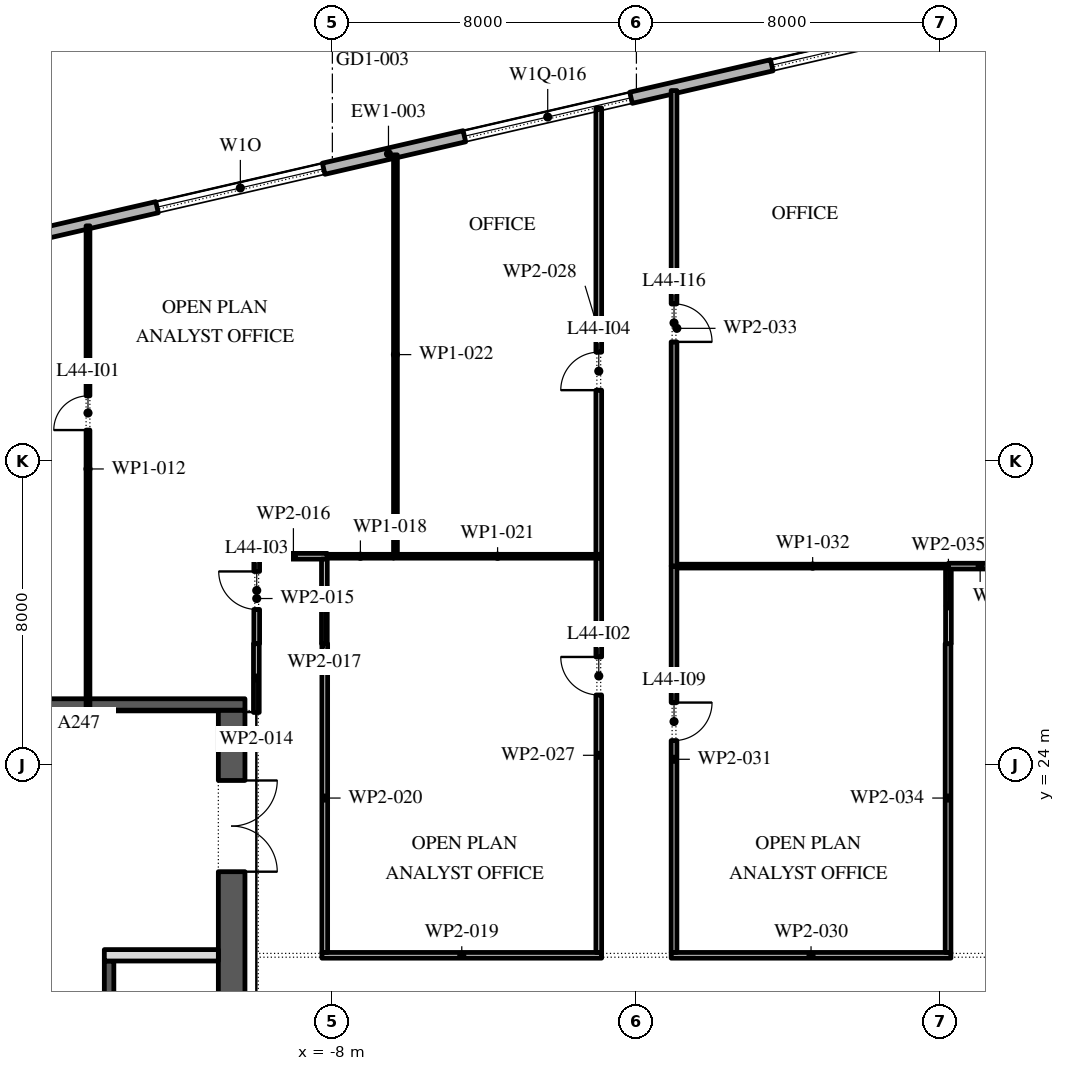
"""IFC4 building model, lengths in metres.
Left out: names, types, materials, properties, quantities, classifications, styles, units other than length and angle.
Written with IfcOpenShell. Run it as: python <this file> out.ifc"""

import sys

from ifc_helpers import new_model, si_unit, direction, frame, frame_2d, origin, place, context, subcontext, project, spatial, rectangle, extrude, element, fill, save


model = new_model("IFC4")
c1 = context("Model", 3, precision=1e-05, world=origin(), true_north=direction((0.0, 1.0)))
c2 = subcontext(c1, "Body", "Model", "MODEL_VIEW")
j1 = project(units=[si_unit("LENGTHUNIT", "METRE"), si_unit("PLANEANGLEUNIT", "RADIAN")], contexts=[c1])
p1 = place(None, origin())
s1 = spatial("IfcSite", under=j1, at=p1, CompositionType="ELEMENT")
p2 = place(p1, origin())
s2 = spatial("IfcBuilding", under=s1, at=p2, CompositionType="ELEMENT")
p3 = place(p2, frame((0.0, 0.0, 201.0)))
s3 = spatial("IfcBuildingStorey", under=s2, at=p3, CompositionType="ELEMENT", Elevation=201.0)
p4 = place(p3, frame((17.592, 45.657, 0.0), z_axis=(0.0, 0.0, 1.0), x_axis=(-0.974370243697, -0.224950279389, 0.0)))
e1 = element("IfcWall", 1, at=p4, inside=s3, PredefinedType="STANDARD", context=c2, shape_type="SweptSolid", body=[
    extrude(rectangle(XDim=49.5, YDim=0.3, at=frame_2d((24.75, 0.0))), origin(), (0.0, 0.0, 1.0), 4.0),
])
p5 = place(p4, frame((2.8, 0.0, 0.0)))
e2 = element("IfcOpeningElement", 2, at=p5, cuts=e1, PredefinedType="OPENING", context=c2, shape_type="SweptSolid", body=[
    extrude(rectangle(XDim=2.4, YDim=3.5, at=frame_2d((1.2, 1.75))), frame((0.0, 0.16, 0.0), z_axis=(0.0, -1.0, 0.0), x_axis=(1.0, 0.0, 0.0)), (0.0, 0.0, 1.0), 0.32),
])
p6 = place(p4, frame((9.9, 0.0, 0.45)))
e3 = element("IfcOpeningElement", 3, at=p6, cuts=e1, PredefinedType="OPENING", context=c2, shape_type="SweptSolid", body=[
    extrude(rectangle(XDim=4.5, YDim=2.45, at=frame_2d((2.25, 1.225))), frame((0.0, 0.16, 0.0), z_axis=(0.0, -1.0, 0.0), x_axis=(1.0, 0.0, 0.0)), (0.0, 0.0, 1.0), 0.32),
])
p7 = place(p4, frame((18.2, 0.0, 0.45)))
e4 = element("IfcOpeningElement", 4, at=p7, cuts=e1, PredefinedType="OPENING", context=c2, shape_type="SweptSolid", body=[
    extrude(rectangle(XDim=4.5, YDim=2.45, at=frame_2d((2.25, 1.225))), frame((0.0, 0.16, 0.0), z_axis=(0.0, -1.0, 0.0), x_axis=(1.0, 0.0, 0.0)), (0.0, 0.0, 1.0), 0.32),
])
p8 = place(p4, frame((26.5, 0.0, 0.45)))
e5 = element("IfcOpeningElement", 5, at=p8, cuts=e1, PredefinedType="OPENING", context=c2, shape_type="SweptSolid", body=[
    extrude(rectangle(XDim=4.5, YDim=2.5, at=frame_2d((2.25, 1.25))), frame((0.0, 0.16, 0.0), z_axis=(0.0, -1.0, 0.0), x_axis=(1.0, 0.0, 0.0)), (0.0, 0.0, 1.0), 0.32),
])
p9 = place(p4, frame((35.85, 0.0, 0.0)))
e6 = element("IfcOpeningElement", 6, at=p9, cuts=e1, PredefinedType="OPENING", context=c2, shape_type="SweptSolid", body=[
    extrude(rectangle(XDim=2.4, YDim=3.5, at=frame_2d((1.2, 1.75))), frame((0.0, 0.16, 0.0), z_axis=(0.0, -1.0, 0.0), x_axis=(1.0, 0.0, 0.0)), (0.0, 0.0, 1.0), 0.32),
])
p10 = place(p4, frame((43.1, 0.0, 0.45)))
e7 = element("IfcOpeningElement", 7, at=p10, cuts=e1, PredefinedType="OPENING", context=c2, shape_type="SweptSolid", body=[
    extrude(rectangle(XDim=4.5, YDim=2.675, at=frame_2d((2.25, 1.337))), frame((0.0, 0.16, 0.0), z_axis=(0.0, -1.0, 0.0), x_axis=(1.0, 0.0, 0.0)), (0.0, 0.0, 1.0), 0.32),
])
p11 = place(p3, frame((-10.65, -2.45, 0.0), z_axis=(0.0, 0.0, 1.0), x_axis=(0.0, 1.0, 0.0)))
e8 = element("IfcWall", 8, at=p11, inside=s3, PredefinedType="SHEAR", context=c2, shape_type="SweptSolid", body=[
    extrude(rectangle(XDim=27.9, YDim=0.7, at=frame_2d((13.95, 0.0))), origin(), (0.0, 0.0, 1.0), 4.0),
])
p12 = place(p11, frame((23.65, 0.0, 0.0)))
e9 = element("IfcOpeningElement", 9, at=p12, cuts=e8, PredefinedType="OPENING", context=c2, shape_type="SweptSolid", body=[
    extrude(rectangle(XDim=2.4, YDim=2.1, at=frame_2d((1.2, 1.05))), frame((0.0, 0.36, 0.0), z_axis=(0.0, -1.0, 0.0), x_axis=(1.0, 0.0, 0.0)), (0.0, 0.0, 1.0), 0.72),
])
p13 = place(p11, frame((1.387, 0.0, 0.0)))
e10 = element("IfcOpeningElement", 10, at=p13, cuts=e8, PredefinedType="OPENING", context=c2, shape_type="SweptSolid", body=[
    extrude(rectangle(XDim=0.9, YDim=2.1, at=frame_2d((0.45, 1.05))), frame((0.0, 0.36, 0.0), z_axis=(0.0, -1.0, 0.0), x_axis=(1.0, 0.0, 0.0)), (0.0, 0.0, 1.0), 0.72),
])
p14 = place(p11, frame((4.562, 0.0, 0.0)))
e11 = element("IfcOpeningElement", 11, at=p14, cuts=e8, PredefinedType="OPENING", context=c2, shape_type="SweptSolid", body=[
    extrude(rectangle(XDim=1.0, YDim=2.1, at=frame_2d((0.5, 1.05))), frame((0.0, 0.36, 0.0), z_axis=(0.0, -1.0, 0.0), x_axis=(1.0, 0.0, 0.0)), (0.0, 0.0, 1.0), 0.72),
])
p15 = place(p3, frame((-21.7, 25.6, 0.0), z_axis=(0.0, 0.0, 1.0), x_axis=(1.0, 0.0, 0.0)))
e12 = element("IfcWall", 12, at=p15, inside=s3, PredefinedType="SHEAR", context=c2, shape_type="SweptSolid", body=[
    extrude(rectangle(XDim=11.4, YDim=0.3, at=frame_2d((5.7, 0.0))), origin(), (0.0, 0.0, 1.0), 4.0),
])
p16 = place(p3, frame((-13.875, -2.45, 0.0), z_axis=(0.0, 0.0, 1.0), x_axis=(0.0, 1.0, 0.0)))
e13 = element("IfcWall", 13, at=p16, inside=s3, PredefinedType="SHEAR", context=c2, shape_type="SweptSolid", body=[
    extrude(rectangle(XDim=21.3, YDim=0.25, at=frame_2d((10.65, 0.0))), origin(), (0.0, 0.0, 1.0), 4.0),
])
p17 = place(p16, frame((17.786, 0.0, 0.0)))
e14 = element("IfcOpeningElement", 14, at=p17, cuts=e13, PredefinedType="OPENING", context=c2, shape_type="SweptSolid", body=[
    extrude(rectangle(XDim=0.9, YDim=2.1, at=frame_2d((0.45, 1.05))), frame((0.0, 0.135, 0.0), z_axis=(0.0, -1.0, 0.0), x_axis=(1.0, 0.0, 0.0)), (0.0, 0.0, 1.0), 0.27),
])
p18 = place(p16, frame((6.971, 0.0, 0.0)))
e15 = element("IfcOpeningElement", 15, at=p18, cuts=e13, PredefinedType="OPENING", context=c2, shape_type="SweptSolid", body=[
    extrude(rectangle(XDim=1.1, YDim=2.1, at=frame_2d((0.55, 1.05))), frame((0.0, 0.135, 0.0), z_axis=(0.0, -1.0, 0.0), x_axis=(1.0, 0.0, 0.0)), (0.0, 0.0, 1.0), 0.27),
])
p19 = place(p16, frame((9.114, 0.0, 0.0)))
e16 = element("IfcOpeningElement", 16, at=p19, cuts=e13, PredefinedType="OPENING", context=c2, shape_type="SweptSolid", body=[
    extrude(rectangle(XDim=1.1, YDim=2.1, at=frame_2d((0.55, 1.05))), frame((0.0, 0.135, 0.0), z_axis=(0.0, -1.0, 0.0), x_axis=(1.0, 0.0, 0.0)), (0.0, 0.0, 1.0), 0.27),
])
p20 = place(p16, frame((11.257, 0.0, 0.0)))
e17 = element("IfcOpeningElement", 17, at=p20, cuts=e13, PredefinedType="OPENING", context=c2, shape_type="SweptSolid", body=[
    extrude(rectangle(XDim=1.1, YDim=2.1, at=frame_2d((0.55, 1.05))), frame((0.0, 0.135, 0.0), z_axis=(0.0, -1.0, 0.0), x_axis=(1.0, 0.0, 0.0)), (0.0, 0.0, 1.0), 0.27),
])
p21 = place(p16, frame((13.4, 0.0, 0.0)))
e18 = element("IfcOpeningElement", 18, at=p21, cuts=e13, PredefinedType="OPENING", context=c2, shape_type="SweptSolid", body=[
    extrude(rectangle(XDim=1.1, YDim=2.1, at=frame_2d((0.55, 1.05))), frame((0.0, 0.135, 0.0), z_axis=(0.0, -1.0, 0.0), x_axis=(1.0, 0.0, 0.0)), (0.0, 0.0, 1.0), 0.27),
])
p22 = place(p3, frame((-14.0, 19.0, 0.0), z_axis=(0.0, 0.0, 1.0), x_axis=(1.0, 0.0, 0.0)))
e19 = element("IfcWall", 19, at=p22, inside=s3, PredefinedType="PARTITIONING", context=c2, shape_type="SweptSolid", body=[
    extrude(rectangle(XDim=3.0, YDim=0.3, at=frame_2d((1.5, 0.0))), origin(), (0.0, 0.0, 1.0), 4.0),
])
p23 = place(p3, frame((-14.43, 38.193, 0.0), z_axis=(0.0, 0.0, 1.0), x_axis=(0.0, -1.0, 0.0)))
e20 = element("IfcWall", 20, at=p23, inside=s3, PredefinedType="PARTITIONING", context=c2, shape_type="SweptSolid", body=[
    extrude(rectangle(XDim=12.793, YDim=0.1, at=frame_2d((6.396, 0.0))), origin(), (0.0, 0.0, 1.0), 4.0),
])
p24 = place(p23, frame((4.473, 0.0, 0.0)))
e21 = element("IfcOpeningElement", 21, at=p24, cuts=e20, PredefinedType="OPENING", context=c2, shape_type="SweptSolid", body=[
    extrude(rectangle(XDim=0.9, YDim=2.1, at=frame_2d((0.45, 1.05))), frame((0.0, 0.06, 0.0), z_axis=(0.0, -1.0, 0.0), x_axis=(1.0, 0.0, 0.0)), (0.0, 0.0, 1.0), 0.12),
])
p25 = place(p3, frame((-10.0, 25.39, 0.0), z_axis=(0.0, 0.0, 1.0), x_axis=(0.0, 1.0, 0.0)))
e22 = element("IfcWall", 22, at=p25, inside=s3, PredefinedType="PARTITIONING", context=c2, shape_type="SweptSolid", body=[
    extrude(rectangle(XDim=1.81, YDim=0.15, at=frame_2d((0.905, 0.0))), origin(), (0.0, 0.0, 1.0), 4.0),
])
p26 = place(p3, frame((-9.99, 27.2, 0.0), z_axis=(0.0, 0.0, 1.0), x_axis=(0.0, 1.0, 0.0)))
e23 = element("IfcWall", 23, at=p26, inside=s3, PredefinedType="PARTITIONING", context=c2, shape_type="SweptSolid", body=[
    extrude(rectangle(XDim=2.375, YDim=0.15, at=frame_2d((1.188, 0.0))), origin(), (0.0, 0.0, 1.0), 4.0),
])
p27 = place(p26, frame((0.9, 0.0, 0.0)))
e24 = element("IfcOpeningElement", 24, at=p27, cuts=e23, PredefinedType="OPENING", context=c2, shape_type="SweptSolid", body=[
    extrude(rectangle(XDim=1.0, YDim=2.1, at=frame_2d((0.5, 1.05))), frame((0.0, 0.085, 0.0), z_axis=(0.0, -1.0, 0.0), x_axis=(1.0, 0.0, 0.0)), (0.0, 0.0, 1.0), 0.17),
])
p28 = place(p3, frame((-9.915, 29.5, 0.0), z_axis=(0.0, 0.0, 1.0), x_axis=(1.0, 0.0, 0.0)))
e25 = element("IfcWall", 25, at=p28, inside=s3, PredefinedType="PARTITIONING", context=c2, shape_type="SweptSolid", body=[
    extrude(rectangle(XDim=1.78, YDim=0.15, at=frame_2d((0.89, 0.0))), origin(), (0.0, 0.0, 1.0), 4.0),
])
p29 = place(p3, frame((-8.21, 29.425, 0.0), z_axis=(0.0, 0.0, 1.0), x_axis=(0.0, -1.0, 0.0)))
e26 = element("IfcWall", 26, at=p29, inside=s3, PredefinedType="PARTITIONING", context=c2, shape_type="SweptSolid", body=[
    extrude(rectangle(XDim=2.225, YDim=0.15, at=frame_2d((1.113, 0.0))), origin(), (0.0, 0.0, 1.0), 4.0),
])
p30 = place(p3, frame((-8.135, 29.5, 0.0), z_axis=(0.0, 0.0, 1.0), x_axis=(1.0, 0.0, 0.0)))
e27 = element("IfcWall", 27, at=p30, inside=s3, PredefinedType="PARTITIONING", context=c2, shape_type="SweptSolid", body=[
    extrude(rectangle(XDim=1.745, YDim=0.1, at=frame_2d((0.873, 0.0))), origin(), (0.0, 0.0, 1.0), 4.0),
])
p31 = place(p3, frame((-8.275, 19.0, 0.0), z_axis=(0.0, 0.0, 1.0), x_axis=(1.0, 0.0, 0.0)))
e28 = element("IfcWall", 28, at=p31, inside=s3, PredefinedType="PARTITIONING", context=c2, shape_type="SweptSolid", body=[
    extrude(rectangle(XDim=7.36, YDim=0.15, at=frame_2d((3.68, 0.0))), origin(), (0.0, 0.0, 1.0), 4.0),
])
p32 = place(p3, frame((-8.2, 27.2, 0.0), z_axis=(0.0, 0.0, 1.0), x_axis=(0.0, -1.0, 0.0)))
e29 = element("IfcWall", 29, at=p32, inside=s3, PredefinedType="PARTITIONING", context=c2, shape_type="SweptSolid", body=[
    extrude(rectangle(XDim=8.125, YDim=0.15, at=frame_2d((4.062, 0.0))), origin(), (0.0, 0.0, 1.0), 4.0),
])
p33 = place(p3, frame((-6.39, 29.5, 0.0), z_axis=(0.0, 0.0, 1.0), x_axis=(1.0, 0.0, 0.0)))
e30 = element("IfcWall", 30, at=p33, inside=s3, PredefinedType="PARTITIONING", context=c2, shape_type="SweptSolid", body=[
    extrude(rectangle(XDim=5.475, YDim=0.1, at=frame_2d((2.737, 0.0))), origin(), (0.0, 0.0, 1.0), 4.0),
])
p34 = place(p3, frame((-6.34, 40.061, 0.0), z_axis=(0.0, 0.0, 1.0), x_axis=(0.0, -1.0, 0.0)))
e31 = element("IfcWall", 31, at=p34, inside=s3, PredefinedType="PARTITIONING", context=c2, shape_type="SweptSolid", body=[
    extrude(rectangle(XDim=10.511, YDim=0.1, at=frame_2d((5.255, 0.0))), origin(), (0.0, 0.0, 1.0), 4.0),
])
p35 = place(p3, frame((-0.99, 19.075, 0.0), z_axis=(0.0, 0.0, 1.0), x_axis=(0.0, 1.0, 0.0)))
e32 = element("IfcWall", 32, at=p35, inside=s3, PredefinedType="PARTITIONING", context=c2, shape_type="SweptSolid", body=[
    extrude(rectangle(XDim=10.375, YDim=0.15, at=frame_2d((5.188, 0.0))), origin(), (0.0, 0.0, 1.0), 4.0),
])
p36 = place(p35, frame((6.775, 0.0, 0.0)))
e33 = element("IfcOpeningElement", 33, at=p36, cuts=e32, PredefinedType="OPENING", context=c2, shape_type="SweptSolid", body=[
    extrude(rectangle(XDim=1.0, YDim=2.1, at=frame_2d((0.5, 1.05))), frame((0.0, 0.085, 0.0), z_axis=(0.0, -1.0, 0.0), x_axis=(1.0, 0.0, 0.0)), (0.0, 0.0, 1.0), 0.17),
])
p37 = place(p3, frame((-0.99, 29.55, 0.0), z_axis=(0.0, 0.0, 1.0), x_axis=(0.0, 1.0, 0.0)))
e34 = element("IfcWall", 34, at=p37, inside=s3, PredefinedType="PARTITIONING", context=c2, shape_type="SweptSolid", body=[
    extrude(rectangle(XDim=11.746, YDim=0.15, at=frame_2d((5.873, 0.0))), origin(), (0.0, 0.0, 1.0), 4.0),
])
p38 = place(p37, frame((4.32, 0.0, 0.0)))
e35 = element("IfcOpeningElement", 35, at=p38, cuts=e34, PredefinedType="OPENING", context=c2, shape_type="SweptSolid", body=[
    extrude(rectangle(XDim=1.0, YDim=2.1, at=frame_2d((0.5, 1.05))), frame((0.0, 0.085, 0.0), z_axis=(0.0, -1.0, 0.0), x_axis=(1.0, 0.0, 0.0)), (0.0, 0.0, 1.0), 0.17),
])
p39 = place(p3, frame((0.915, 19.0, 0.0), z_axis=(0.0, 0.0, 1.0), x_axis=(1.0, 0.0, 0.0)))
e36 = element("IfcWall", 36, at=p39, inside=s3, PredefinedType="PARTITIONING", context=c2, shape_type="SweptSolid", body=[
    extrude(rectangle(XDim=7.36, YDim=0.15, at=frame_2d((3.68, 0.0))), origin(), (0.0, 0.0, 1.0), 4.0),
])
p40 = place(p3, frame((0.99, 29.24, 0.0), z_axis=(0.0, 0.0, 1.0), x_axis=(0.0, -1.0, 0.0)))
e37 = element("IfcWall", 37, at=p40, inside=s3, PredefinedType="PARTITIONING", context=c2, shape_type="SweptSolid", body=[
    extrude(rectangle(XDim=10.165, YDim=0.15, at=frame_2d((5.083, 0.0))), origin(), (0.0, 0.0, 1.0), 4.0),
])
p41 = place(p40, frame((3.59, 0.0, 0.0)))
e38 = element("IfcOpeningElement", 38, at=p41, cuts=e37, PredefinedType="OPENING", context=c2, shape_type="SweptSolid", body=[
    extrude(rectangle(XDim=1.0, YDim=2.1, at=frame_2d((0.5, 1.05))), frame((0.0, 0.085, 0.0), z_axis=(0.0, -1.0, 0.0), x_axis=(1.0, 0.0, 0.0)), (0.0, 0.0, 1.0), 0.17),
])
p42 = place(p3, frame((1.065, 29.24, 0.0), z_axis=(0.0, 0.0, 1.0), x_axis=(1.0, 0.0, 0.0)))
e39 = element("IfcWall", 39, at=p42, inside=s3, PredefinedType="PARTITIONING", context=c2, shape_type="SweptSolid", body=[
    extrude(rectangle(XDim=7.145, YDim=0.1, at=frame_2d((3.573, 0.0))), origin(), (0.0, 0.0, 1.0), 4.0),
])
p43 = place(p3, frame((0.99, 41.753, 0.0), z_axis=(0.0, 0.0, 1.0), x_axis=(0.0, -1.0, 0.0)))
e40 = element("IfcWall", 40, at=p43, inside=s3, PredefinedType="PARTITIONING", context=c2, shape_type="SweptSolid", body=[
    extrude(rectangle(XDim=12.513, YDim=0.15, at=frame_2d((6.256, 0.0))), origin(), (0.0, 0.0, 1.0), 4.0),
])
p44 = place(p43, frame((5.613, 0.0, 0.0)))
e41 = element("IfcOpeningElement", 41, at=p44, cuts=e40, PredefinedType="OPENING", context=c2, shape_type="SweptSolid", body=[
    extrude(rectangle(XDim=1.0, YDim=2.1, at=frame_2d((0.5, 1.05))), frame((0.0, 0.085, 0.0), z_axis=(0.0, -1.0, 0.0), x_axis=(1.0, 0.0, 0.0)), (0.0, 0.0, 1.0), 0.17),
])
p45 = place(p3, frame((8.2, 19.075, 0.0), z_axis=(0.0, 0.0, 1.0), x_axis=(0.0, 1.0, 0.0)))
e42 = element("IfcWall", 42, at=p45, inside=s3, PredefinedType="PARTITIONING", context=c2, shape_type="SweptSolid", body=[
    extrude(rectangle(XDim=8.125, YDim=0.15, at=frame_2d((4.062, 0.0))), origin(), (0.0, 0.0, 1.0), 4.0),
])
p46 = place(p3, frame((8.21, 27.2, 0.0), z_axis=(0.0, 0.0, 1.0), x_axis=(0.0, 1.0, 0.0)))
e43 = element("IfcWall", 43, at=p46, inside=s3, PredefinedType="PARTITIONING", context=c2, shape_type="SweptSolid", body=[
    extrude(rectangle(XDim=1.99, YDim=0.15, at=frame_2d((0.995, 0.0))), origin(), (0.0, 0.0, 1.0), 4.0),
])
p47 = place(p3, frame((8.21, 29.24, 0.0), z_axis=(0.0, 0.0, 1.0), x_axis=(1.0, 0.0, 0.0)))
e44 = element("IfcWall", 44, at=p47, inside=s3, PredefinedType="PARTITIONING", context=c2, shape_type="SweptSolid", body=[
    extrude(rectangle(XDim=1.67, YDim=0.15, at=frame_2d((0.835, 0.0))), origin(), (0.0, 0.0, 1.0), 4.0),
])
p48 = place(p6, origin())
e45 = element("IfcWindow", 45, at=p48, inside=s3, PartitioningType="DOUBLE_PANEL_VERTICAL", PredefinedType="WINDOW", context=c2, shape_type="SweptSolid", body=[
    extrude(rectangle(XDim=4.5, YDim=2.45, at=frame_2d((2.25, 1.225))), frame((0.0, 0.03, 0.0), z_axis=(0.0, -1.0, 0.0), x_axis=(1.0, 0.0, 0.0)), (0.0, 0.0, 1.0), 0.06),
])
fill(e3, e45)
p49 = place(p7, origin())
e46 = element("IfcWindow", 46, at=p49, inside=s3, PartitioningType="DOUBLE_PANEL_VERTICAL", PredefinedType="WINDOW", context=c2, shape_type="SweptSolid", body=[
    extrude(rectangle(XDim=4.5, YDim=2.45, at=frame_2d((2.25, 1.225))), frame((0.0, 0.03, 0.0), z_axis=(0.0, -1.0, 0.0), x_axis=(1.0, 0.0, 0.0)), (0.0, 0.0, 1.0), 0.06),
])
fill(e4, e46)
p50 = place(p8, origin())
e47 = element("IfcWindow", 47, at=p50, inside=s3, PartitioningType="DOUBLE_PANEL_VERTICAL", PredefinedType="WINDOW", context=c2, shape_type="SweptSolid", body=[
    extrude(rectangle(XDim=4.5, YDim=2.5, at=frame_2d((2.25, 1.25))), frame((0.0, 0.03, 0.0), z_axis=(0.0, -1.0, 0.0), x_axis=(1.0, 0.0, 0.0)), (0.0, 0.0, 1.0), 0.06),
])
fill(e5, e47)
p51 = place(p12, frame((2.4, 0.0, 0.0), z_axis=(0.0, 0.0, 1.0), x_axis=(-1.0, 0.0, 0.0)))
e48 = element("IfcDoor", 48, at=p51, inside=s3, OperationType="DOUBLE_DOOR_SINGLE_SWING", PredefinedType="DOOR", context=c2, shape_type="SweptSolid", body=[
    extrude(rectangle(XDim=2.4, YDim=2.1, at=frame_2d((1.2, 1.05))), frame((0.0, 0.025, 0.0), z_axis=(0.0, -1.0, 0.0), x_axis=(1.0, 0.0, 0.0)), (0.0, 0.0, 1.0), 0.05),
])
fill(e9, e48)
p52 = place(p24, frame((0.9, 0.0, 0.0), z_axis=(0.0, 0.0, 1.0), x_axis=(-1.0, 0.0, 0.0)))
e49 = element("IfcDoor", 49, at=p52, inside=s3, OperationType="SINGLE_SWING_RIGHT", PredefinedType="DOOR", context=c2, shape_type="SweptSolid", body=[
    extrude(rectangle(XDim=0.9, YDim=2.1, at=frame_2d((0.45, 1.05))), frame((0.0, 0.025, 0.0), z_axis=(0.0, -1.0, 0.0), x_axis=(1.0, 0.0, 0.0)), (0.0, 0.0, 1.0), 0.05),
])
fill(e21, e49)
p53 = place(p36, origin())
e50 = element("IfcDoor", 50, at=p53, inside=s3, OperationType="SINGLE_SWING_LEFT", PredefinedType="DOOR", context=c2, shape_type="SweptSolid", body=[
    extrude(rectangle(XDim=1.0, YDim=2.1, at=frame_2d((0.5, 1.05))), frame((0.0, 0.025, 0.0), z_axis=(0.0, -1.0, 0.0), x_axis=(1.0, 0.0, 0.0)), (0.0, 0.0, 1.0), 0.05),
])
fill(e33, e50)
p54 = place(p27, origin())
e51 = element("IfcDoor", 51, at=p54, inside=s3, OperationType="SINGLE_SWING_LEFT", PredefinedType="DOOR", context=c2, shape_type="SweptSolid", body=[
    extrude(rectangle(XDim=1.0, YDim=2.1, at=frame_2d((0.5, 1.05))), frame((0.0, 0.025, 0.0), z_axis=(0.0, -1.0, 0.0), x_axis=(1.0, 0.0, 0.0)), (0.0, 0.0, 1.0), 0.05),
])
fill(e24, e51)
p55 = place(p38, origin())
e52 = element("IfcDoor", 52, at=p55, inside=s3, OperationType="SINGLE_SWING_RIGHT", PredefinedType="DOOR", context=c2, shape_type="SweptSolid", body=[
    extrude(rectangle(XDim=1.0, YDim=2.1, at=frame_2d((0.5, 1.05))), frame((0.0, 0.025, 0.0), z_axis=(0.0, -1.0, 0.0), x_axis=(1.0, 0.0, 0.0)), (0.0, 0.0, 1.0), 0.05),
])
fill(e35, e52)
p56 = place(p41, origin())
e53 = element("IfcDoor", 53, at=p56, inside=s3, OperationType="SINGLE_SWING_RIGHT", PredefinedType="DOOR", context=c2, shape_type="SweptSolid", body=[
    extrude(rectangle(XDim=1.0, YDim=2.1, at=frame_2d((0.5, 1.05))), frame((0.0, 0.025, 0.0), z_axis=(0.0, -1.0, 0.0), x_axis=(1.0, 0.0, 0.0)), (0.0, 0.0, 1.0), 0.05),
])
fill(e38, e53)
p57 = place(p44, origin())
e54 = element("IfcDoor", 54, at=p57, inside=s3, OperationType="SINGLE_SWING_LEFT", PredefinedType="DOOR", context=c2, shape_type="SweptSolid", body=[
    extrude(rectangle(XDim=1.0, YDim=2.1, at=frame_2d((0.5, 1.05))), frame((0.0, 0.025, 0.0), z_axis=(0.0, -1.0, 0.0), x_axis=(1.0, 0.0, 0.0)), (0.0, 0.0, 1.0), 0.05),
])
fill(e41, e54)
save(model, sys.argv[1])
